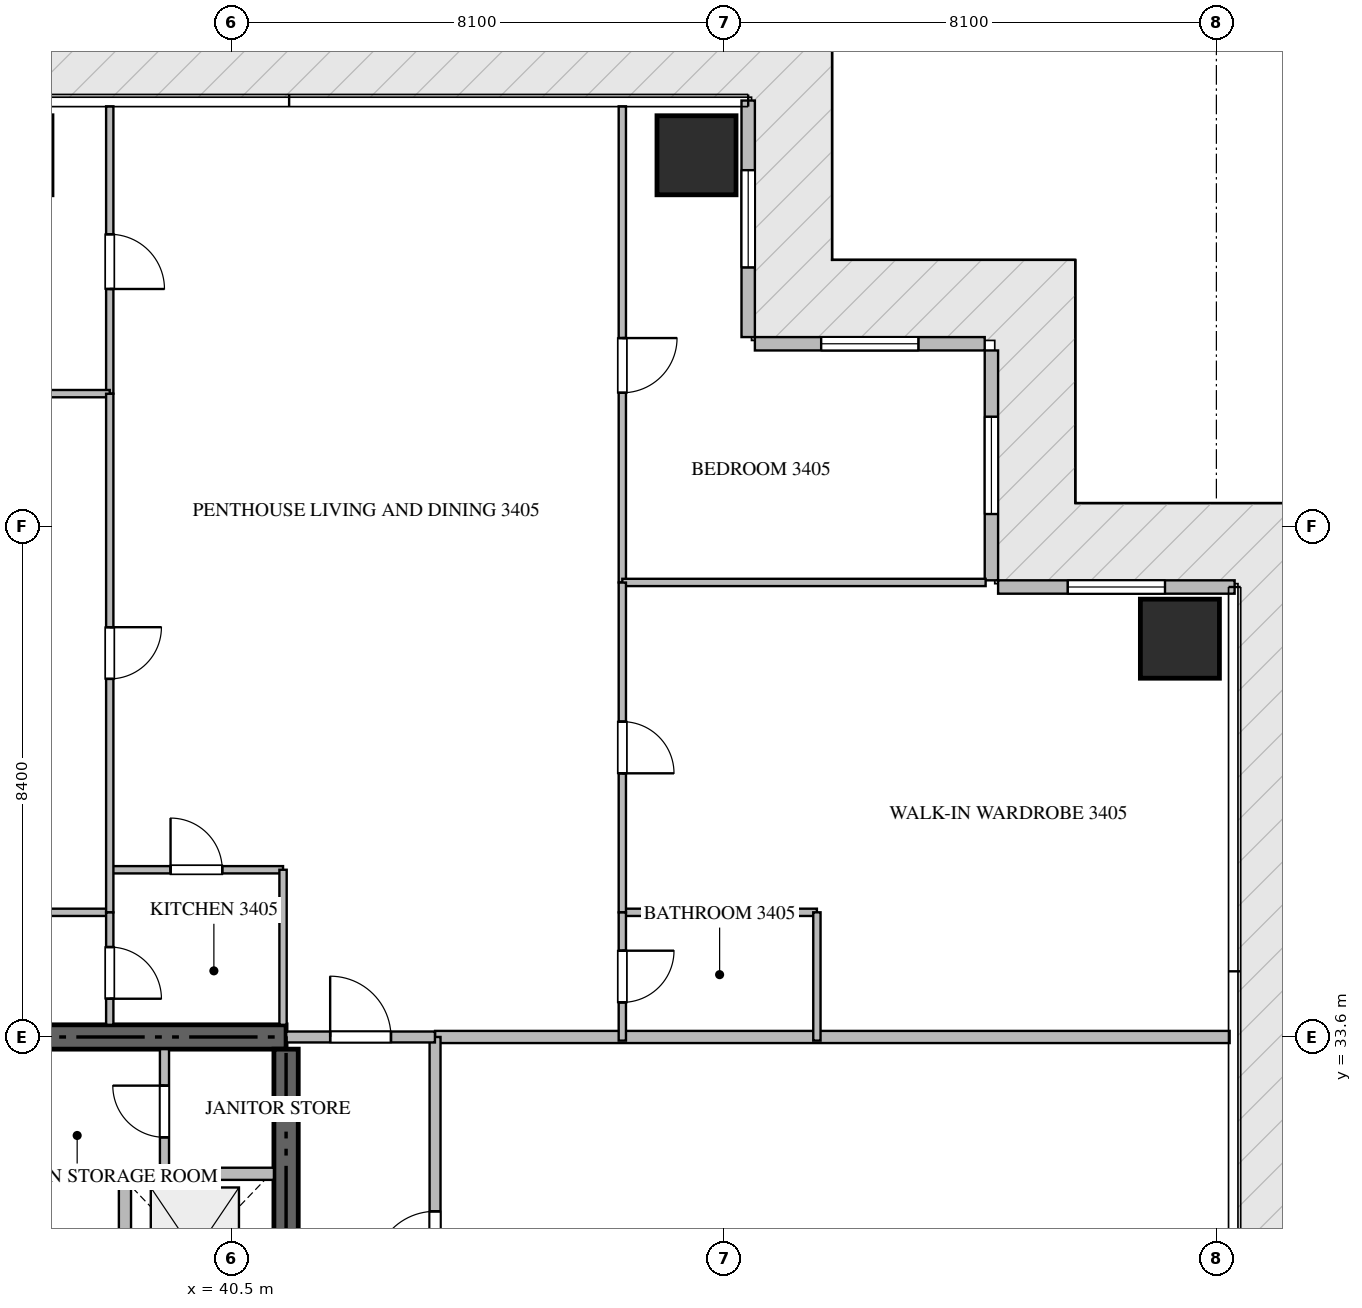
"""IFC4 building model, lengths in metres.
Left out: names, types, materials, properties, quantities, classifications, styles, units other than length and angle.
Written with IfcOpenShell. Run it as: python <this file> out.ifc"""

import sys

from ifc_helpers import new_model, si_unit, direction, frame, frame_2d, origin, origin_2d, place, context, subcontext, project, spatial, rectangle, extrude, source, transform, mapped, element, fill, save


model = new_model("IFC4")
c1 = context("Model", 3, precision=1e-05, world=origin(), true_north=direction((0.0, 1.0)))
c2 = subcontext(c1, "Body", "Model", "MODEL_VIEW")
j1 = project(units=[si_unit("LENGTHUNIT", "METRE"), si_unit("PLANEANGLEUNIT", "RADIAN")], contexts=[c1])
p1 = place(None, origin())
s1 = spatial("IfcSite", under=j1, at=p1, CompositionType="ELEMENT")
p2 = place(p1, origin())
s2 = spatial("IfcBuilding", under=s1, at=p2, CompositionType="ELEMENT")
p3 = place(p2, frame((0.0, 0.0, 138.9)))
s3 = spatial("IfcBuildingStorey", under=s2, at=p3, CompositionType="ELEMENT", Elevation=138.9)
p4 = place(p3, frame((41.4, 33.6, -0.26), z_axis=(0.0, 0.0, 1.0), x_axis=(-1.0, 0.0, 0.0)))
e1 = element("IfcWall", 1, at=p4, inside=s3, PredefinedType="SHEAR", context=c2, shape_type="SweptSolid", body=[
    extrude(rectangle(XDim=18.0, YDim=0.4, at=frame_2d((9.0, 0.0))), origin(), (0.0, 0.0, 1.0), 3.748),
])
p5 = place(p3, frame((41.4, 27.75, -0.26), z_axis=(0.0, 0.0, 1.0), x_axis=(0.0, 1.0, 0.0)))
e2 = element("IfcWall", 2, at=p5, inside=s3, PredefinedType="SHEAR", context=c2, shape_type="SweptSolid", body=[
    extrude(rectangle(XDim=5.65, YDim=0.4, at=frame_2d((2.825, 0.0))), origin(), (0.0, 0.0, 1.0), 3.748),
])
m1 = source(origin(), c2, "Body", "SweptSolid", [
    extrude(rectangle(XDim=1.3, YDim=1.3, at=origin_2d()), origin(), (0.0, 0.0, 1.0), 3.75),
])
for number, where, z_axis, x_axis in (
    (3, (48.15, 48.1, -0.26), (0.0, 0.0, 1.0), (1.0, 0.0, 0.0)),
    (4, (56.1, 40.15, -0.26), (0.0, 0.0, 1.0), (1.0, 0.0, 0.0)),
):
    element("IfcColumn", number, at=place(p3, frame(where, z_axis=z_axis, x_axis=x_axis)), inside=s3, PredefinedType="COLUMN", context=c2, shape_type="MappedRepresentation", body=[
        mapped(m1, transform((0.0, 0.0, 0.0), scale=1.0)),
    ])
p6 = place(p3, frame((57.0, 41.0, 0.0), z_axis=(0.0, 0.0, 1.0), x_axis=(-1.0, 0.0, 0.0)))
e5 = element("IfcWall", 5, at=p6, inside=s3, PredefinedType="ELEMENTEDWALL", context=c2, shape_type="SweptSolid", body=[
    extrude(rectangle(XDim=3.89, YDim=0.22, at=frame_2d((1.945, 0.0))), origin(), (0.0, 0.0, 1.0), 3.475),
])
p7 = place(p6, frame((1.145, 0.0, 0.65)))
e6 = element("IfcOpeningElement", 6, at=p7, cuts=e5, PredefinedType="OPENING", context=c2, shape_type="SweptSolid", body=[
    extrude(rectangle(XDim=1.6, YDim=2.1, at=frame_2d((0.8, 1.05))), frame((0.0, 0.12, 0.0), z_axis=(0.0, -1.0, 0.0), x_axis=(1.0, 0.0, 0.0)), (0.0, 0.0, 1.0), 0.24),
])
p8 = place(p3, frame((53.0, 41.11, 0.0), z_axis=(0.0, 0.0, 1.0), x_axis=(0.0, 1.0, 0.0)))
e7 = element("IfcWall", 7, at=p8, inside=s3, PredefinedType="ELEMENTEDWALL", context=c2, shape_type="SweptSolid", body=[
    extrude(rectangle(XDim=3.78, YDim=0.22, at=frame_2d((1.89, 0.0))), origin(), (0.0, 0.0, 1.0), 3.475),
])
p9 = place(p8, frame((1.09, 0.0, 0.65)))
e8 = element("IfcOpeningElement", 8, at=p9, cuts=e7, PredefinedType="OPENING", context=c2, shape_type="SweptSolid", body=[
    extrude(rectangle(XDim=1.6, YDim=2.1, at=frame_2d((0.8, 1.05))), frame((0.0, 0.12, 0.0), z_axis=(0.0, -1.0, 0.0), x_axis=(1.0, 0.0, 0.0)), (0.0, 0.0, 1.0), 0.24),
])
p10 = place(p3, frame((52.89, 45.0, 0.0), z_axis=(0.0, 0.0, 1.0), x_axis=(-1.0, 0.0, 0.0)))
e9 = element("IfcWall", 9, at=p10, inside=s3, PredefinedType="ELEMENTEDWALL", context=c2, shape_type="SweptSolid", body=[
    extrude(rectangle(XDim=3.78, YDim=0.22, at=frame_2d((1.89, 0.0))), origin(), (0.0, 0.0, 1.0), 3.475),
])
p11 = place(p10, frame((1.09, 0.0, 0.65)))
e10 = element("IfcOpeningElement", 10, at=p11, cuts=e9, PredefinedType="OPENING", context=c2, shape_type="SweptSolid", body=[
    extrude(rectangle(XDim=1.6, YDim=2.1, at=frame_2d((0.8, 1.05))), frame((0.0, 0.12, 0.0), z_axis=(0.0, -1.0, 0.0), x_axis=(1.0, 0.0, 0.0)), (0.0, 0.0, 1.0), 0.24),
])
p12 = place(p3, frame((49.0, 45.11, 0.0), z_axis=(0.0, 0.0, 1.0), x_axis=(0.0, 1.0, 0.0)))
e11 = element("IfcWall", 11, at=p12, inside=s3, PredefinedType="ELEMENTEDWALL", context=c2, shape_type="SweptSolid", body=[
    extrude(rectangle(XDim=3.89, YDim=0.22, at=frame_2d((1.945, 0.0))), origin(), (0.0, 0.0, 1.0), 3.475),
])
p13 = place(p12, frame((1.145, 0.0, 0.65)))
e12 = element("IfcOpeningElement", 12, at=p13, cuts=e11, PredefinedType="OPENING", context=c2, shape_type="SweptSolid", body=[
    extrude(rectangle(XDim=1.6, YDim=2.1, at=frame_2d((0.8, 1.05))), frame((0.0, 0.12, 0.0), z_axis=(0.0, -1.0, 0.0), x_axis=(1.0, 0.0, 0.0)), (0.0, 0.0, 1.0), 0.24),
])
p14 = place(p3, frame((38.75, 28.85, 0.0), z_axis=(0.0, 0.0, 1.0), x_axis=(0.0, 1.0, 0.0)))
e13 = element("IfcWall", 13, at=p14, inside=s3, PredefinedType="STANDARD", context=c2, shape_type="SweptSolid", body=[
    extrude(rectangle(XDim=2.5, YDim=0.2, at=frame_2d((1.25, 0.0))), origin(), (0.0, 0.0, 1.0), 3.49),
])
p15 = place(p3, frame((38.75, 31.35, 0.0), z_axis=(0.0, 0.0, 1.0), x_axis=(1.0, 0.0, 0.0)))
e14 = element("IfcWall", 14, at=p15, inside=s3, PredefinedType="STANDARD", context=c2, shape_type="SweptSolid", body=[
    extrude(rectangle(XDim=2.45, YDim=0.2, at=frame_2d((1.225, 0.0))), origin(), (0.0, 0.0, 1.0), 3.49),
])
p16 = place(p3, frame((39.4, 31.35, 0.0), z_axis=(0.0, 0.0, 1.0), x_axis=(0.0, 1.0, 0.0)))
e15 = element("IfcWall", 15, at=p16, inside=s3, PredefinedType="PARTITIONING", context=c2, shape_type="SweptSolid", body=[
    extrude(rectangle(XDim=2.05, YDim=0.15, at=frame_2d((1.025, 0.0))), origin(), (0.0, 0.0, 1.0), 3.49),
])
p17 = place(p16, frame((0.6, 0.0, 0.0)))
e16 = element("IfcOpeningElement", 16, at=p17, cuts=e15, PredefinedType="OPENING", context=c2, shape_type="SweptSolid", body=[
    extrude(rectangle(XDim=0.85, YDim=2.1, at=frame_2d((0.425, 1.05))), frame((0.0, 0.085, 0.0), z_axis=(0.0, -1.0, 0.0), x_axis=(1.0, 0.0, 0.0)), (0.0, 0.0, 1.0), 0.17),
])
p18 = place(p3, frame((43.85, 33.6, 0.0), z_axis=(0.0, 0.0, 1.0), x_axis=(1.0, 0.0, 0.0)))
e17 = element("IfcWall", 17, at=p18, inside=s3, PredefinedType="PARTITIONING", context=c2, shape_type="SweptSolid", body=[
    extrude(rectangle(XDim=13.068, YDim=0.2, at=frame_2d((6.534, 0.0))), origin(), (0.0, 0.0, 1.0), 3.49),
])
p19 = place(p3, frame((43.85, 14.9, 0.0), z_axis=(0.0, 0.0, 1.0), x_axis=(0.0, 1.0, 0.0)))
e18 = element("IfcWall", 18, at=p19, inside=s3, PredefinedType="PARTITIONING", context=c2, shape_type="SweptSolid", body=[
    extrude(rectangle(XDim=18.7, YDim=0.18, at=frame_2d((9.35, 0.0))), origin(), (0.0, 0.0, 1.0), 3.49),
])
p20 = place(p19, frame((1.805, 0.0, 0.0)))
e19 = element("IfcOpeningElement", 19, at=p20, cuts=e18, PredefinedType="OPENING", context=c2, shape_type="SweptSolid", body=[
    extrude(rectangle(XDim=1.0, YDim=2.15, at=frame_2d((0.5, 1.075))), frame((0.0, 0.1, 0.0), z_axis=(0.0, -1.0, 0.0), x_axis=(1.0, 0.0, 0.0)), (0.0, 0.0, 1.0), 0.2),
])
p21 = place(p19, frame((14.833, 0.0, 0.0)))
e20 = element("IfcOpeningElement", 20, at=p21, cuts=e18, PredefinedType="OPENING", context=c2, shape_type="SweptSolid", body=[
    extrude(rectangle(XDim=1.0, YDim=2.15, at=frame_2d((0.5, 1.075))), frame((0.0, 0.1, 0.0), z_axis=(0.0, -1.0, 0.0), x_axis=(1.0, 0.0, 0.0)), (0.0, 0.0, 1.0), 0.2),
])
p22 = place(p3, frame((41.402, 33.6, 0.0), z_axis=(0.0, 0.0, 1.0), x_axis=(1.0, 0.0, 0.0)))
e21 = element("IfcWall", 21, at=p22, inside=s3, PredefinedType="PARTITIONING", context=c2, shape_type="SweptSolid", body=[
    extrude(rectangle(XDim=2.446, YDim=0.18, at=frame_2d((1.223, 0.0))), origin(), (0.0, 0.0, 1.0), 3.49),
])
p23 = place(p22, frame((0.723, 0.0, 0.0)))
e22 = element("IfcOpeningElement", 22, at=p23, cuts=e21, PredefinedType="OPENING", context=c2, shape_type="SweptSolid", body=[
    extrude(rectangle(XDim=1.0, YDim=2.15, at=frame_2d((0.5, 1.075))), frame((0.0, 0.1, 0.0), z_axis=(0.0, -1.0, 0.0), x_axis=(1.0, 0.0, 0.0)), (0.0, 0.0, 1.0), 0.2),
])
p24 = place(p3, frame((38.5, 36.35, 0.0), z_axis=(0.0, 0.0, 1.0), x_axis=(1.0, 0.0, 0.0)))
e23 = element("IfcWall", 23, at=p24, inside=s3, PredefinedType="PARTITIONING", context=c2, shape_type="SweptSolid", body=[
    extrude(rectangle(XDim=2.85, YDim=0.12, at=frame_2d((1.425, 0.0))), origin(), (0.0, 0.0, 1.0), 3.49),
])
p25 = place(p24, frame((1.0, 0.0, 0.0)))
e24 = element("IfcOpeningElement", 24, at=p25, cuts=e23, PredefinedType="OPENING", context=c2, shape_type="SweptSolid", body=[
    extrude(rectangle(XDim=0.85, YDim=2.1, at=frame_2d((0.425, 1.05))), frame((0.0, 0.07, 0.0), z_axis=(0.0, -1.0, 0.0), x_axis=(1.0, 0.0, 0.0)), (0.0, 0.0, 1.0), 0.14),
])
p26 = place(p3, frame((41.35, 36.35, 0.0), z_axis=(0.0, 0.0, 1.0), x_axis=(0.0, -1.0, 0.0)))
e25 = element("IfcWall", 25, at=p26, inside=s3, PredefinedType="PARTITIONING", context=c2, shape_type="SweptSolid", body=[
    extrude(rectangle(XDim=2.55, YDim=0.12, at=frame_2d((1.275, 0.0))), origin(), (0.0, 0.0, 1.0), 3.49),
])
p27 = place(p3, frame((38.5, 48.905, 0.0), z_axis=(0.0, 0.0, 1.0), x_axis=(0.0, -1.0, 0.0)))
e26 = element("IfcWall", 26, at=p27, inside=s3, PredefinedType="PARTITIONING", context=c2, shape_type="SweptSolid", body=[
    extrude(rectangle(XDim=4.725, YDim=0.12, at=frame_2d((2.363, 0.0))), origin(), (0.0, 0.0, 1.0), 3.49),
])
p28 = place(p27, frame((2.104, 0.0, 0.0)))
e27 = element("IfcOpeningElement", 27, at=p28, cuts=e26, PredefinedType="OPENING", context=c2, shape_type="SweptSolid", body=[
    extrude(rectangle(XDim=0.9, YDim=2.1, at=frame_2d((0.45, 1.05))), frame((0.0, 0.07, 0.0), z_axis=(0.0, -1.0, 0.0), x_axis=(1.0, 0.0, 0.0)), (0.0, 0.0, 1.0), 0.14),
])
for number, where, z_axis, x_axis in (
    (28, (29.44, 44.18, 0.0), (0.0, 0.0, 1.0), (1.0, 0.0, 0.0)),
    (29, (29.44, 35.65, 0.0), (0.0, 0.0, 1.0), (1.0, 0.0, 0.0)),
):
    element("IfcWall", number, at=place(p3, frame(where, z_axis=z_axis, x_axis=x_axis)), inside=s3, PredefinedType="PARTITIONING", context=c2, shape_type="SweptSolid", body=[
        extrude(rectangle(XDim=9.06, YDim=0.12, at=frame_2d((4.53, 0.0))), origin(), (0.0, 0.0, 1.0), 3.49),
    ])
p29 = place(p3, frame((38.5, 44.178, 0.0), z_axis=(0.0, 0.0, 1.0), x_axis=(0.0, -1.0, 0.0)))
e30 = element("IfcWall", 30, at=p29, inside=s3, PredefinedType="PARTITIONING", context=c2, shape_type="SweptSolid", body=[
    extrude(rectangle(XDim=8.528, YDim=0.12, at=frame_2d((4.264, 0.0))), origin(), (0.0, 0.0, 1.0), 3.49),
])
p30 = place(p29, frame((3.839, 0.0, 0.0)))
e31 = element("IfcOpeningElement", 31, at=p30, cuts=e30, PredefinedType="OPENING", context=c2, shape_type="SweptSolid", body=[
    extrude(rectangle(XDim=0.85, YDim=2.1, at=frame_2d((0.425, 1.05))), frame((0.0, 0.07, 0.0), z_axis=(0.0, -1.0, 0.0), x_axis=(1.0, 0.0, 0.0)), (0.0, 0.0, 1.0), 0.14),
])
p31 = place(p3, frame((38.5, 35.648, 0.0), z_axis=(0.0, 0.0, 1.0), x_axis=(0.0, -1.0, 0.0)))
e32 = element("IfcWall", 32, at=p31, inside=s3, PredefinedType="PARTITIONING", context=c2, shape_type="SweptSolid", body=[
    extrude(rectangle(XDim=1.848, YDim=0.12, at=frame_2d((0.924, 0.0))), origin(), (0.0, 0.0, 1.0), 3.49),
])
p32 = place(p31, frame((0.569, 0.0, 0.0)))
e33 = element("IfcOpeningElement", 33, at=p32, cuts=e32, PredefinedType="OPENING", context=c2, shape_type="SweptSolid", body=[
    extrude(rectangle(XDim=0.85, YDim=2.1, at=frame_2d((0.425, 1.05))), frame((0.0, 0.07, 0.0), z_axis=(0.0, -1.0, 0.0), x_axis=(1.0, 0.0, 0.0)), (0.0, 0.0, 1.0), 0.14),
])
p33 = place(p3, frame((46.93, 48.905, 0.0), z_axis=(0.0, 0.0, 1.0), x_axis=(0.0, -1.0, 0.0)))
e34 = element("IfcWall", 34, at=p33, inside=s3, PredefinedType="PARTITIONING", context=c2, shape_type="SweptSolid", body=[
    extrude(rectangle(XDim=7.83, YDim=0.12, at=frame_2d((3.915, 0.0))), origin(), (0.0, 0.0, 1.0), 3.49),
])
p34 = place(p33, frame((3.811, 0.0, 0.0)))
e35 = element("IfcOpeningElement", 35, at=p34, cuts=e34, PredefinedType="OPENING", context=c2, shape_type="SweptSolid", body=[
    extrude(rectangle(XDim=0.9, YDim=2.1, at=frame_2d((0.45, 1.05))), frame((0.0, 0.07, 0.0), z_axis=(0.0, -1.0, 0.0), x_axis=(1.0, 0.0, 0.0)), (0.0, 0.0, 1.0), 0.14),
])
p35 = place(p3, frame((46.93, 41.075, 0.0), z_axis=(0.0, 0.0, 1.0), x_axis=(1.0, 0.0, 0.0)))
e36 = element("IfcWall", 36, at=p35, inside=s3, PredefinedType="PARTITIONING", context=c2, shape_type="SweptSolid", body=[
    extrude(rectangle(XDim=5.975, YDim=0.12, at=frame_2d((2.988, 0.0))), origin(), (0.0, 0.0, 1.0), 3.49),
])
p36 = place(p3, frame((46.93, 35.65, 0.0), z_axis=(0.0, 0.0, 1.0), x_axis=(1.0, 0.0, 0.0)))
e37 = element("IfcWall", 37, at=p36, inside=s3, PredefinedType="PARTITIONING", context=c2, shape_type="SweptSolid", body=[
    extrude(rectangle(XDim=3.2, YDim=0.12, at=frame_2d((1.6, 0.0))), origin(), (0.0, 0.0, 1.0), 3.49),
])
p37 = place(p3, frame((50.13, 35.65, 0.0), z_axis=(0.0, 0.0, 1.0), x_axis=(0.0, -1.0, 0.0)))
e38 = element("IfcWall", 38, at=p37, inside=s3, PredefinedType="PARTITIONING", context=c2, shape_type="SweptSolid", body=[
    extrude(rectangle(XDim=2.11, YDim=0.12, at=frame_2d((1.055, 0.0))), origin(), (0.0, 0.0, 1.0), 3.49),
])
p38 = place(p3, frame((46.93, 41.073, 0.0), z_axis=(0.0, 0.0, 1.0), x_axis=(0.0, -1.0, 0.0)))
e39 = element("IfcWall", 39, at=p38, inside=s3, PredefinedType="PARTITIONING", context=c2, shape_type="SweptSolid", body=[
    extrude(rectangle(XDim=5.423, YDim=0.12, at=frame_2d((2.711, 0.0))), origin(), (0.0, 0.0, 1.0), 3.49),
])
p39 = place(p38, frame((2.287, 0.0, 0.0)))
e40 = element("IfcOpeningElement", 40, at=p39, cuts=e39, PredefinedType="OPENING", context=c2, shape_type="SweptSolid", body=[
    extrude(rectangle(XDim=0.85, YDim=2.1, at=frame_2d((0.425, 1.05))), frame((0.0, 0.07, 0.0), z_axis=(0.0, -1.0, 0.0), x_axis=(1.0, 0.0, 0.0)), (0.0, 0.0, 1.0), 0.14),
])
p40 = place(p3, frame((46.93, 35.648, 0.0), z_axis=(0.0, 0.0, 1.0), x_axis=(0.0, -1.0, 0.0)))
e41 = element("IfcWall", 41, at=p40, inside=s3, PredefinedType="PARTITIONING", context=c2, shape_type="SweptSolid", body=[
    extrude(rectangle(XDim=2.108, YDim=0.12, at=frame_2d((1.054, 0.0))), origin(), (0.0, 0.0, 1.0), 3.49),
])
p41 = place(p40, frame((0.629, 0.0, 0.0)))
e42 = element("IfcOpeningElement", 42, at=p41, cuts=e41, PredefinedType="OPENING", context=c2, shape_type="SweptSolid", body=[
    extrude(rectangle(XDim=0.85, YDim=2.1, at=frame_2d((0.425, 1.05))), frame((0.0, 0.07, 0.0), z_axis=(0.0, -1.0, 0.0), x_axis=(1.0, 0.0, 0.0)), (0.0, 0.0, 1.0), 0.14),
])
m2 = source(origin(), c2, "Body", "SweptSolid", [
    extrude(rectangle(XDim=1.6, YDim=2.1, at=frame_2d((0.8, 1.05))), frame((0.0, 0.03, 0.0), z_axis=(0.0, -1.0, 0.0), x_axis=(1.0, 0.0, 0.0)), (0.0, 0.0, 1.0), 0.06),
])
p42 = place(p7, origin())
e43 = element("IfcWindow", 43, at=p42, inside=s3, PartitioningType="SINGLE_PANEL", PredefinedType="WINDOW", context=c2, shape_type="MappedRepresentation", body=[
    mapped(m2, transform((0.0, 0.0, 0.0), scale=1.0)),
])
fill(e6, e43)
p43 = place(p9, origin())
e44 = element("IfcWindow", 44, at=p43, inside=s3, PartitioningType="SINGLE_PANEL", PredefinedType="WINDOW", context=c2, shape_type="MappedRepresentation", body=[
    mapped(m2, transform((0.0, 0.0, 0.0), scale=1.0)),
])
fill(e8, e44)
p44 = place(p11, origin())
e45 = element("IfcWindow", 45, at=p44, inside=s3, PartitioningType="SINGLE_PANEL", PredefinedType="WINDOW", context=c2, shape_type="MappedRepresentation", body=[
    mapped(m2, transform((0.0, 0.0, 0.0), scale=1.0)),
])
fill(e10, e45)
p45 = place(p13, origin())
e46 = element("IfcWindow", 46, at=p45, inside=s3, PartitioningType="SINGLE_PANEL", PredefinedType="WINDOW", context=c2, shape_type="MappedRepresentation", body=[
    mapped(m2, transform((0.0, 0.0, 0.0), scale=1.0)),
])
fill(e12, e46)
m3 = source(origin(), c2, "Body", "SweptSolid", [
    extrude(rectangle(XDim=0.85, YDim=2.1, at=frame_2d((0.425, 1.05))), frame((0.0, 0.025, 0.0), z_axis=(0.0, -1.0, 0.0), x_axis=(1.0, 0.0, 0.0)), (0.0, 0.0, 1.0), 0.05),
])
p46 = place(p17, origin())
e47 = element("IfcDoor", 47, at=p46, inside=s3, OperationType="SINGLE_SWING_RIGHT", PredefinedType="DOOR", context=c2, shape_type="MappedRepresentation", body=[
    mapped(m3, transform((0.0, 0.0, 0.0), scale=1.0)),
])
fill(e16, e47)
m4 = source(origin(), c2, "Body", "SweptSolid", [
    extrude(rectangle(XDim=1.0, YDim=2.15, at=frame_2d((0.5, 1.075))), frame((0.0, 0.025, 0.0), z_axis=(0.0, -1.0, 0.0), x_axis=(1.0, 0.0, 0.0)), (0.0, 0.0, 1.0), 0.05),
])
p47 = place(p21, origin())
e48 = element("IfcDoor", 48, at=p47, inside=s3, OperationType="SINGLE_SWING_LEFT", PredefinedType="DOOR", context=c2, shape_type="MappedRepresentation", body=[
    mapped(m4, transform((0.0, 0.0, 0.0), scale=1.0)),
])
fill(e20, e48)
p48 = place(p23, origin())
e49 = element("IfcDoor", 49, at=p48, inside=s3, OperationType="SINGLE_SWING_LEFT", PredefinedType="DOOR", context=c2, shape_type="MappedRepresentation", body=[
    mapped(m4, transform((0.0, 0.0, 0.0), scale=1.0)),
])
fill(e22, e49)
p49 = place(p25, origin())
e50 = element("IfcDoor", 50, at=p49, inside=s3, OperationType="SINGLE_SWING_LEFT", PredefinedType="DOOR", context=c2, shape_type="MappedRepresentation", body=[
    mapped(m3, transform((0.0, 0.0, 0.0), scale=1.0)),
])
fill(e24, e50)
m5 = source(origin(), c2, "Body", "SweptSolid", [
    extrude(rectangle(XDim=0.9, YDim=2.1, at=frame_2d((0.45, 1.05))), frame((0.0, 0.025, 0.0), z_axis=(0.0, -1.0, 0.0), x_axis=(1.0, 0.0, 0.0)), (0.0, 0.0, 1.0), 0.05),
])
p50 = place(p28, origin())
e51 = element("IfcDoor", 51, at=p50, inside=s3, OperationType="SINGLE_SWING_RIGHT", PredefinedType="DOOR", context=c2, shape_type="MappedRepresentation", body=[
    mapped(m5, transform((0.0, 0.0, 0.0), scale=1.0)),
])
fill(e27, e51)
p51 = place(p30, origin())
e52 = element("IfcDoor", 52, at=p51, inside=s3, OperationType="SINGLE_SWING_LEFT", PredefinedType="DOOR", context=c2, shape_type="MappedRepresentation", body=[
    mapped(m3, transform((0.0, 0.0, 0.0), scale=1.0)),
])
fill(e31, e52)
p52 = place(p32, origin())
e53 = element("IfcDoor", 53, at=p52, inside=s3, OperationType="SINGLE_SWING_RIGHT", PredefinedType="DOOR", context=c2, shape_type="MappedRepresentation", body=[
    mapped(m3, transform((0.0, 0.0, 0.0), scale=1.0)),
])
fill(e33, e53)
p53 = place(p34, origin())
e54 = element("IfcDoor", 54, at=p53, inside=s3, OperationType="SINGLE_SWING_LEFT", PredefinedType="DOOR", context=c2, shape_type="MappedRepresentation", body=[
    mapped(m5, transform((0.0, 0.0, 0.0), scale=1.0)),
])
fill(e35, e54)
p54 = place(p39, origin())
e55 = element("IfcDoor", 55, at=p54, inside=s3, OperationType="SINGLE_SWING_RIGHT", PredefinedType="DOOR", context=c2, shape_type="MappedRepresentation", body=[
    mapped(m3, transform((0.0, 0.0, 0.0), scale=1.0)),
])
fill(e40, e55)
p55 = place(p41, origin())
e56 = element("IfcDoor", 56, at=p55, inside=s3, OperationType="SINGLE_SWING_LEFT", PredefinedType="DOOR", context=c2, shape_type="MappedRepresentation", body=[
    mapped(m3, transform((0.0, 0.0, 0.0), scale=1.0)),
])
fill(e42, e56)
save(model, sys.argv[1])
